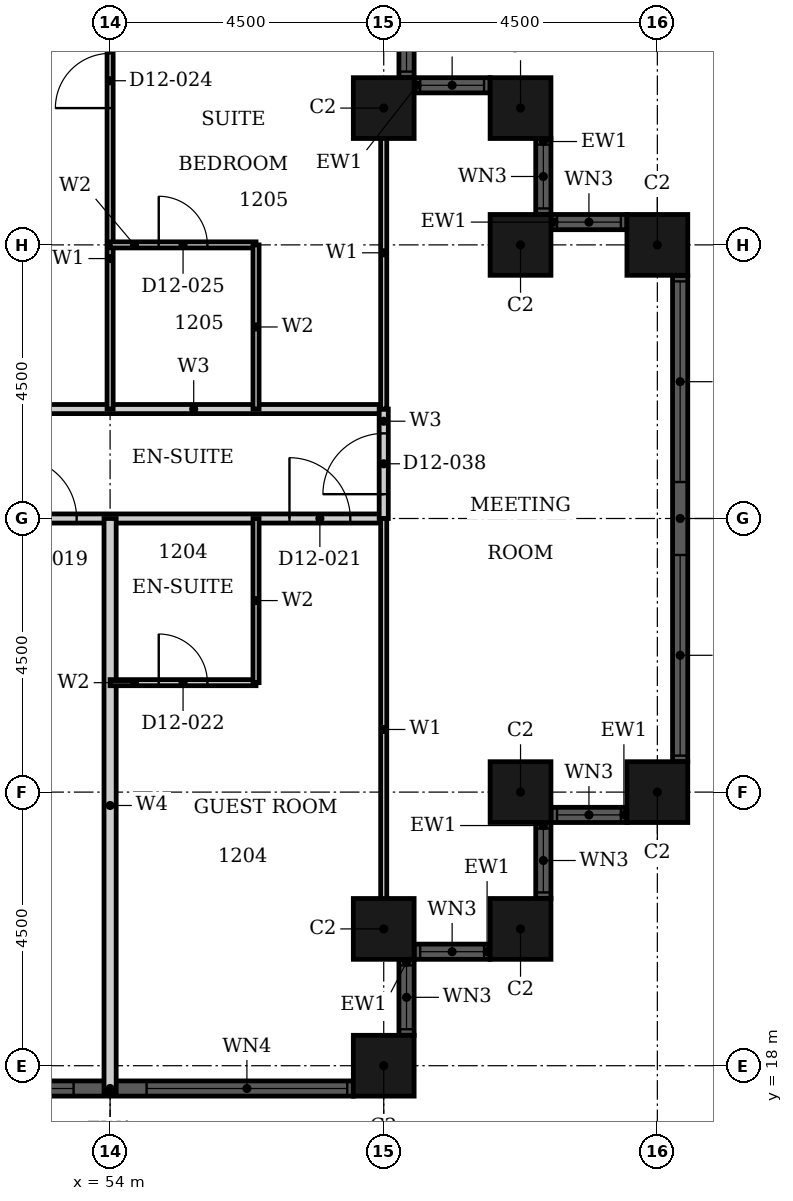
"""IFC4 building model, lengths in metres.
Left out: names, types, materials, properties, quantities, classifications, styles, units other than length and angle.
Written with IfcOpenShell. Run it as: python <this file> out.ifc"""

import sys

from ifc_helpers import new_model, si_unit, direction, frame, frame_2d, origin, origin_2d, place, context, subcontext, project, spatial, rectangle, hollow_rectangle, extrude, element, fill, save


model = new_model("IFC4")
c1 = context("Model", 3, precision=1e-05, world=origin(), true_north=direction((0.0, 1.0)))
c2 = subcontext(c1, "Body", "Model", "MODEL_VIEW")
j1 = project(units=[si_unit("LENGTHUNIT", "METRE"), si_unit("PLANEANGLEUNIT", "RADIAN")], contexts=[c1])
p1 = place(None, origin())
s1 = spatial("IfcSite", under=j1, at=p1, CompositionType="ELEMENT")
p2 = place(p1, origin())
s2 = spatial("IfcBuilding", under=s1, at=p2, CompositionType="ELEMENT")
p3 = place(p2, frame((0.0, 0.0, 56.4)))
s3 = spatial("IfcBuildingStorey", under=s2, at=p3, CompositionType="ELEMENT", Elevation=56.4)
for number, where, z_axis, x_axis in (
    (1, (58.5, 18.0, 0.0), (0.0, 0.0, 1.0), (1.0, 0.0, 0.0)),
    (2, (58.5, 20.25, 0.0), (0.0, 0.0, 1.0), (1.0, 0.0, 0.0)),
    (3, (60.75, 20.25, 0.0), (0.0, 0.0, 1.0), (1.0, 0.0, 0.0)),
    (4, (60.75, 22.5, 0.0), (0.0, 0.0, 1.0), (1.0, 0.0, 0.0)),
    (5, (63.0, 22.5, 0.0), (0.0, 0.0, 1.0), (1.0, 0.0, 0.0)),
    (6, (63.0, 31.5, 0.0), (0.0, 0.0, 1.0), (1.0, 0.0, 0.0)),
    (7, (60.75, 31.5, 0.0), (0.0, 0.0, 1.0), (1.0, 0.0, 0.0)),
    (8, (60.75, 33.75, 0.0), (0.0, 0.0, 1.0), (1.0, 0.0, 0.0)),
    (9, (58.5, 33.75, 0.0), (0.0, 0.0, 1.0), (1.0, 0.0, 0.0)),
):
    element("IfcColumn", number, at=place(p3, frame(where, z_axis=z_axis, x_axis=x_axis)), inside=s3, PredefinedType="COLUMN", context=c2, shape_type="SweptSolid", body=[
        extrude(hollow_rectangle(XDim=1.0, YDim=1.0, WallThickness=0.032, at=origin_2d()), origin(), (0.0, 0.0, 1.0), 3.6),
    ])
p4 = place(p3, frame((50.0, 17.625, 0.0), z_axis=(0.0, 0.0, 1.0), x_axis=(1.0, 0.0, 0.0)))
e10 = element("IfcWall", 10, at=p4, inside=s3, PredefinedType="SOLIDWALL", context=c2, shape_type="SweptSolid", body=[
    extrude(rectangle(XDim=8.0, YDim=0.25, at=frame_2d((4.0, 0.0))), origin(), (0.0, 0.0, 1.0), 3.6),
])
p5 = place(p4, frame((0.1, 0.0, 0.9)))
e11 = element("IfcOpeningElement", 11, at=p5, cuts=e10, PredefinedType="OPENING", context=c2, shape_type="SweptSolid", body=[
    extrude(rectangle(XDim=3.3, YDim=2.08, at=frame_2d((1.65, 1.04))), frame((0.0, 0.135, 0.0), z_axis=(0.0, -1.0, 0.0), x_axis=(1.0, 0.0, 0.0)), (0.0, 0.0, 1.0), 0.27),
])
p6 = place(p4, frame((4.6, 0.0, 0.9)))
e12 = element("IfcOpeningElement", 12, at=p6, cuts=e10, PredefinedType="OPENING", context=c2, shape_type="SweptSolid", body=[
    extrude(rectangle(XDim=3.3, YDim=2.08, at=frame_2d((1.65, 1.04))), frame((0.0, 0.135, 0.0), z_axis=(0.0, -1.0, 0.0), x_axis=(1.0, 0.0, 0.0)), (0.0, 0.0, 1.0), 0.27),
])
p7 = place(p3, frame((58.875, 18.5, 0.0), z_axis=(0.0, 0.0, 1.0), x_axis=(0.0, 1.0, 0.0)))
e13 = element("IfcWall", 13, at=p7, inside=s3, PredefinedType="SOLIDWALL", context=c2, shape_type="SweptSolid", body=[
    extrude(rectangle(XDim=1.25, YDim=0.25, at=frame_2d((0.625, 0.0))), origin(), (0.0, 0.0, 1.0), 3.6),
])
p8 = place(p7, frame((0.1, 0.0, 0.9)))
e14 = element("IfcOpeningElement", 14, at=p8, cuts=e13, PredefinedType="OPENING", context=c2, shape_type="SweptSolid", body=[
    extrude(rectangle(XDim=1.05, YDim=2.08, at=frame_2d((0.525, 1.04))), frame((0.0, 0.135, 0.0), z_axis=(0.0, -1.0, 0.0), x_axis=(1.0, 0.0, 0.0)), (0.0, 0.0, 1.0), 0.27),
])
p9 = place(p3, frame((59.0, 19.875, 0.0), z_axis=(0.0, 0.0, 1.0), x_axis=(1.0, 0.0, 0.0)))
e15 = element("IfcWall", 15, at=p9, inside=s3, PredefinedType="SOLIDWALL", context=c2, shape_type="SweptSolid", body=[
    extrude(rectangle(XDim=1.25, YDim=0.25, at=frame_2d((0.625, 0.0))), origin(), (0.0, 0.0, 1.0), 3.6),
])
p10 = place(p9, frame((0.1, 0.0, 0.9)))
e16 = element("IfcOpeningElement", 16, at=p10, cuts=e15, PredefinedType="OPENING", context=c2, shape_type="SweptSolid", body=[
    extrude(rectangle(XDim=1.05, YDim=2.08, at=frame_2d((0.525, 1.04))), frame((0.0, 0.135, 0.0), z_axis=(0.0, -1.0, 0.0), x_axis=(1.0, 0.0, 0.0)), (0.0, 0.0, 1.0), 0.27),
])
p11 = place(p3, frame((61.125, 20.75, 0.0), z_axis=(0.0, 0.0, 1.0), x_axis=(0.0, 1.0, 0.0)))
e17 = element("IfcWall", 17, at=p11, inside=s3, PredefinedType="SOLIDWALL", context=c2, shape_type="SweptSolid", body=[
    extrude(rectangle(XDim=1.25, YDim=0.25, at=frame_2d((0.625, 0.0))), origin(), (0.0, 0.0, 1.0), 3.6),
])
p12 = place(p11, frame((0.1, 0.0, 0.9)))
e18 = element("IfcOpeningElement", 18, at=p12, cuts=e17, PredefinedType="OPENING", context=c2, shape_type="SweptSolid", body=[
    extrude(rectangle(XDim=1.05, YDim=2.08, at=frame_2d((0.525, 1.04))), frame((0.0, 0.135, 0.0), z_axis=(0.0, -1.0, 0.0), x_axis=(1.0, 0.0, 0.0)), (0.0, 0.0, 1.0), 0.27),
])
p13 = place(p3, frame((61.25, 22.125, 0.0), z_axis=(0.0, 0.0, 1.0), x_axis=(1.0, 0.0, 0.0)))
e19 = element("IfcWall", 19, at=p13, inside=s3, PredefinedType="SOLIDWALL", context=c2, shape_type="SweptSolid", body=[
    extrude(rectangle(XDim=1.25, YDim=0.25, at=frame_2d((0.625, 0.0))), origin(), (0.0, 0.0, 1.0), 3.6),
])
p14 = place(p13, frame((0.1, 0.0, 0.9)))
e20 = element("IfcOpeningElement", 20, at=p14, cuts=e19, PredefinedType="OPENING", context=c2, shape_type="SweptSolid", body=[
    extrude(rectangle(XDim=1.05, YDim=2.08, at=frame_2d((0.525, 1.04))), frame((0.0, 0.135, 0.0), z_axis=(0.0, -1.0, 0.0), x_axis=(1.0, 0.0, 0.0)), (0.0, 0.0, 1.0), 0.27),
])
p15 = place(p3, frame((63.375, 23.0, 0.0), z_axis=(0.0, 0.0, 1.0), x_axis=(0.0, 1.0, 0.0)))
e21 = element("IfcWall", 21, at=p15, inside=s3, PredefinedType="SOLIDWALL", context=c2, shape_type="SweptSolid", body=[
    extrude(rectangle(XDim=8.0, YDim=0.25, at=frame_2d((4.0, 0.0))), origin(), (0.0, 0.0, 1.0), 3.6),
])
p16 = place(p15, frame((0.1, 0.0, 0.9)))
e22 = element("IfcOpeningElement", 22, at=p16, cuts=e21, PredefinedType="OPENING", context=c2, shape_type="SweptSolid", body=[
    extrude(rectangle(XDim=3.3, YDim=2.08, at=frame_2d((1.65, 1.04))), frame((0.0, 0.135, 0.0), z_axis=(0.0, -1.0, 0.0), x_axis=(1.0, 0.0, 0.0)), (0.0, 0.0, 1.0), 0.27),
])
p17 = place(p15, frame((4.6, 0.0, 0.9)))
e23 = element("IfcOpeningElement", 23, at=p17, cuts=e21, PredefinedType="OPENING", context=c2, shape_type="SweptSolid", body=[
    extrude(rectangle(XDim=3.3, YDim=2.08, at=frame_2d((1.65, 1.04))), frame((0.0, 0.135, 0.0), z_axis=(0.0, -1.0, 0.0), x_axis=(1.0, 0.0, 0.0)), (0.0, 0.0, 1.0), 0.27),
])
p18 = place(p3, frame((62.5, 31.875, 0.0), z_axis=(0.0, 0.0, 1.0), x_axis=(-1.0, 0.0, 0.0)))
e24 = element("IfcWall", 24, at=p18, inside=s3, PredefinedType="SOLIDWALL", context=c2, shape_type="SweptSolid", body=[
    extrude(rectangle(XDim=1.25, YDim=0.25, at=frame_2d((0.625, 0.0))), origin(), (0.0, 0.0, 1.0), 3.6),
])
p19 = place(p18, frame((0.1, 0.0, 0.9)))
e25 = element("IfcOpeningElement", 25, at=p19, cuts=e24, PredefinedType="OPENING", context=c2, shape_type="SweptSolid", body=[
    extrude(rectangle(XDim=1.05, YDim=2.08, at=frame_2d((0.525, 1.04))), frame((0.0, 0.135, 0.0), z_axis=(0.0, -1.0, 0.0), x_axis=(1.0, 0.0, 0.0)), (0.0, 0.0, 1.0), 0.27),
])
p20 = place(p3, frame((61.125, 32.0, 0.0), z_axis=(0.0, 0.0, 1.0), x_axis=(0.0, 1.0, 0.0)))
e26 = element("IfcWall", 26, at=p20, inside=s3, PredefinedType="SOLIDWALL", context=c2, shape_type="SweptSolid", body=[
    extrude(rectangle(XDim=1.25, YDim=0.25, at=frame_2d((0.625, 0.0))), origin(), (0.0, 0.0, 1.0), 3.6),
])
p21 = place(p20, frame((0.1, 0.0, 0.9)))
e27 = element("IfcOpeningElement", 27, at=p21, cuts=e26, PredefinedType="OPENING", context=c2, shape_type="SweptSolid", body=[
    extrude(rectangle(XDim=1.05, YDim=2.08, at=frame_2d((0.525, 1.04))), frame((0.0, 0.135, 0.0), z_axis=(0.0, -1.0, 0.0), x_axis=(1.0, 0.0, 0.0)), (0.0, 0.0, 1.0), 0.27),
])
p22 = place(p3, frame((60.25, 34.125, 0.0), z_axis=(0.0, 0.0, 1.0), x_axis=(-1.0, 0.0, 0.0)))
e28 = element("IfcWall", 28, at=p22, inside=s3, PredefinedType="SOLIDWALL", context=c2, shape_type="SweptSolid", body=[
    extrude(rectangle(XDim=1.25, YDim=0.25, at=frame_2d((0.625, 0.0))), origin(), (0.0, 0.0, 1.0), 3.6),
])
p23 = place(p22, frame((0.1, 0.0, 0.9)))
e29 = element("IfcOpeningElement", 29, at=p23, cuts=e28, PredefinedType="OPENING", context=c2, shape_type="SweptSolid", body=[
    extrude(rectangle(XDim=1.05, YDim=2.08, at=frame_2d((0.525, 1.04))), frame((0.0, 0.135, 0.0), z_axis=(0.0, -1.0, 0.0), x_axis=(1.0, 0.0, 0.0)), (0.0, 0.0, 1.0), 0.27),
])
p24 = place(p3, frame((58.875, 34.25, 0.0), z_axis=(0.0, 0.0, 1.0), x_axis=(0.0, 1.0, 0.0)))
e30 = element("IfcWall", 30, at=p24, inside=s3, PredefinedType="SOLIDWALL", context=c2, shape_type="SweptSolid", body=[
    extrude(rectangle(XDim=1.25, YDim=0.25, at=frame_2d((0.625, 0.0))), origin(), (0.0, 0.0, 1.0), 3.6),
])
p25 = place(p24, frame((0.1, 0.0, 0.9)))
e31 = element("IfcOpeningElement", 31, at=p25, cuts=e30, PredefinedType="OPENING", context=c2, shape_type="SweptSolid", body=[
    extrude(rectangle(XDim=1.05, YDim=2.08, at=frame_2d((0.525, 1.04))), frame((0.0, 0.135, 0.0), z_axis=(0.0, -1.0, 0.0), x_axis=(1.0, 0.0, 0.0)), (0.0, 0.0, 1.0), 0.27),
])
p26 = place(p3, frame((46.8, 27.0, 0.0), z_axis=(0.0, 0.0, 1.0), x_axis=(1.0, 0.0, 0.0)))
e32 = element("IfcWall", 32, at=p26, inside=s3, PredefinedType="PARTITIONING", context=c2, shape_type="SweptSolid", body=[
    extrude(rectangle(XDim=11.7, YDim=0.15, at=frame_2d((5.85, 0.0))), origin(), (0.0, 0.0, 1.0), 2.58),
])
p27 = place(p26, frame((5.65, 0.0, 0.0)))
e33 = element("IfcOpeningElement", 33, at=p27, cuts=e32, PredefinedType="OPENING", context=c2, shape_type="SweptSolid", body=[
    extrude(rectangle(XDim=1.0, YDim=2.1, at=frame_2d((0.5, 1.05))), frame((0.0, 0.085, 0.0), z_axis=(0.0, -1.0, 0.0), x_axis=(1.0, 0.0, 0.0)), (0.0, 0.0, 1.0), 0.17),
])
p28 = place(p26, frame((10.15, 0.0, 0.0)))
e34 = element("IfcOpeningElement", 34, at=p28, cuts=e32, PredefinedType="OPENING", context=c2, shape_type="SweptSolid", body=[
    extrude(rectangle(XDim=1.0, YDim=2.1, at=frame_2d((0.5, 1.05))), frame((0.0, 0.085, 0.0), z_axis=(0.0, -1.0, 0.0), x_axis=(1.0, 0.0, 0.0)), (0.0, 0.0, 1.0), 0.17),
])
p29 = place(p3, frame((46.8, 28.8, 0.0), z_axis=(0.0, 0.0, 1.0), x_axis=(1.0, 0.0, 0.0)))
e35 = element("IfcWall", 35, at=p29, inside=s3, PredefinedType="PARTITIONING", context=c2, shape_type="SweptSolid", body=[
    extrude(rectangle(XDim=11.7, YDim=0.15, at=frame_2d((5.85, 0.0))), origin(), (0.0, 0.0, 1.0), 3.3),
])
p30 = place(p29, frame((4.45, 0.0, 0.0)))
e36 = element("IfcOpeningElement", 36, at=p30, cuts=e35, PredefinedType="OPENING", context=c2, shape_type="SweptSolid", body=[
    extrude(rectangle(XDim=1.0, YDim=2.1, at=frame_2d((0.5, 1.05))), frame((0.0, 0.085, 0.0), z_axis=(0.0, -1.0, 0.0), x_axis=(1.0, 0.0, 0.0)), (0.0, 0.0, 1.0), 0.17),
])
p31 = place(p3, frame((58.5, 27.0, 0.0), z_axis=(0.0, 0.0, 1.0), x_axis=(0.0, 1.0, 0.0)))
e37 = element("IfcWall", 37, at=p31, inside=s3, PredefinedType="PARTITIONING", context=c2, shape_type="SweptSolid", body=[
    extrude(rectangle(XDim=1.8, YDim=0.15, at=frame_2d((0.9, 0.0))), origin(), (0.0, 0.0, 1.0), 3.3),
])
p32 = place(p31, frame((0.4, 0.0, 0.0)))
e38 = element("IfcOpeningElement", 38, at=p32, cuts=e37, PredefinedType="OPENING", context=c2, shape_type="SweptSolid", body=[
    extrude(rectangle(XDim=1.0, YDim=2.1, at=frame_2d((0.5, 1.05))), frame((0.0, 0.085, 0.0), z_axis=(0.0, -1.0, 0.0), x_axis=(1.0, 0.0, 0.0)), (0.0, 0.0, 1.0), 0.17),
])
p33 = place(p3, frame((54.0, 28.8, 0.0), z_axis=(0.0, 0.0, 1.0), x_axis=(0.0, 1.0, 0.0)))
e39 = element("IfcWall", 39, at=p33, inside=s3, PredefinedType="PARTITIONING", context=c2, shape_type="SweptSolid", body=[
    extrude(rectangle(XDim=7.64, YDim=0.1, at=frame_2d((3.82, 0.0))), origin(), (0.0, 0.0, 1.0), 3.3),
])
p34 = place(p33, frame((4.95, 0.0, 0.0)))
e40 = element("IfcOpeningElement", 40, at=p34, cuts=e39, PredefinedType="OPENING", context=c2, shape_type="SweptSolid", body=[
    extrude(rectangle(XDim=0.9, YDim=2.1, at=frame_2d((0.45, 1.05))), frame((0.0, 0.06, 0.0), z_axis=(0.0, -1.0, 0.0), x_axis=(1.0, 0.0, 0.0)), (0.0, 0.0, 1.0), 0.12),
])
p35 = place(p3, frame((58.5, 20.06, 0.0), z_axis=(0.0, 0.0, 1.0), x_axis=(0.0, 1.0, 0.0)))
e41 = element("IfcWall", 41, at=p35, inside=s3, PredefinedType="PARTITIONING", context=c2, shape_type="SweptSolid", body=[
    extrude(rectangle(XDim=6.94, YDim=0.1, at=frame_2d((3.47, 0.0))), origin(), (0.0, 0.0, 1.0), 3.3),
])
p36 = place(p3, frame((58.5, 28.8, 0.0), z_axis=(0.0, 0.0, 1.0), x_axis=(0.0, 1.0, 0.0)))
e42 = element("IfcWall", 42, at=p36, inside=s3, PredefinedType="PARTITIONING", context=c2, shape_type="SweptSolid", body=[
    extrude(rectangle(XDim=5.14, YDim=0.1, at=frame_2d((2.57, 0.0))), origin(), (0.0, 0.0, 1.0), 3.3),
])
p37 = place(p3, frame((54.0, 17.56, 0.0), z_axis=(0.0, 0.0, 1.0), x_axis=(0.0, 1.0, 0.0)))
e43 = element("IfcWall", 43, at=p37, inside=s3, PredefinedType="PARTITIONING", context=c2, shape_type="SweptSolid", body=[
    extrude(rectangle(XDim=9.44, YDim=0.2, at=frame_2d((4.72, 0.0))), origin(), (0.0, 0.0, 1.0), 3.3),
])
p38 = place(p3, frame((54.0, 24.3, 0.0), z_axis=(0.0, 0.0, 1.0), x_axis=(1.0, 0.0, 0.0)))
e44 = element("IfcWall", 44, at=p38, inside=s3, PredefinedType="PARTITIONING", context=c2, shape_type="SweptSolid", body=[
    extrude(rectangle(XDim=2.4, YDim=0.1, at=frame_2d((1.2, 0.0))), origin(), (0.0, 0.0, 1.0), 3.3),
])
p39 = place(p38, frame((0.8, 0.0, 0.0)))
e45 = element("IfcOpeningElement", 45, at=p39, cuts=e44, PredefinedType="OPENING", context=c2, shape_type="SweptSolid", body=[
    extrude(rectangle(XDim=0.8, YDim=2.1, at=frame_2d((0.4, 1.05))), frame((0.0, 0.06, 0.0), z_axis=(0.0, -1.0, 0.0), x_axis=(1.0, 0.0, 0.0)), (0.0, 0.0, 1.0), 0.12),
])
p40 = place(p3, frame((54.0, 31.5, 0.0), z_axis=(0.0, 0.0, 1.0), x_axis=(1.0, 0.0, 0.0)))
e46 = element("IfcWall", 46, at=p40, inside=s3, PredefinedType="PARTITIONING", context=c2, shape_type="SweptSolid", body=[
    extrude(rectangle(XDim=2.4, YDim=0.1, at=frame_2d((1.2, 0.0))), origin(), (0.0, 0.0, 1.0), 2.58),
])
p41 = place(p40, frame((0.8, 0.0, 0.0)))
e47 = element("IfcOpeningElement", 47, at=p41, cuts=e46, PredefinedType="OPENING", context=c2, shape_type="SweptSolid", body=[
    extrude(rectangle(XDim=0.8, YDim=2.1, at=frame_2d((0.4, 1.05))), frame((0.0, 0.06, 0.0), z_axis=(0.0, -1.0, 0.0), x_axis=(1.0, 0.0, 0.0)), (0.0, 0.0, 1.0), 0.12),
])
for number, where, z_axis, x_axis in (
    (48, (56.4, 24.3, 0.0), (0.0, 0.0, 1.0), (0.0, 1.0, 0.0)),
    (49, (56.4, 28.8, 0.0), (0.0, 0.0, 1.0), (0.0, 1.0, 0.0)),
):
    element("IfcWall", number, at=place(p3, frame(where, z_axis=z_axis, x_axis=x_axis)), inside=s3, PredefinedType="PARTITIONING", context=c2, shape_type="SweptSolid", body=[
        extrude(rectangle(XDim=2.7, YDim=0.1, at=frame_2d((1.35, 0.0))), origin(), (0.0, 0.0, 1.0), 3.3),
    ])
p42 = place(p5, origin())
e50 = element("IfcWindow", 50, at=p42, inside=s3, PartitioningType="SINGLE_PANEL", PredefinedType="WINDOW", context=c2, shape_type="SweptSolid", body=[
    extrude(rectangle(XDim=3.3, YDim=2.08, at=frame_2d((1.65, 1.04))), frame((0.0, 0.03, 0.0), z_axis=(0.0, -1.0, 0.0), x_axis=(1.0, 0.0, 0.0)), (0.0, 0.0, 1.0), 0.06),
])
fill(e11, e50)
p43 = place(p6, origin())
e51 = element("IfcWindow", 51, at=p43, inside=s3, PartitioningType="SINGLE_PANEL", PredefinedType="WINDOW", context=c2, shape_type="SweptSolid", body=[
    extrude(rectangle(XDim=3.3, YDim=2.08, at=frame_2d((1.65, 1.04))), frame((0.0, 0.03, 0.0), z_axis=(0.0, -1.0, 0.0), x_axis=(1.0, 0.0, 0.0)), (0.0, 0.0, 1.0), 0.06),
])
fill(e12, e51)
p44 = place(p8, origin())
e52 = element("IfcWindow", 52, at=p44, inside=s3, PartitioningType="SINGLE_PANEL", PredefinedType="WINDOW", context=c2, shape_type="SweptSolid", body=[
    extrude(rectangle(XDim=1.05, YDim=2.08, at=frame_2d((0.525, 1.04))), frame((0.0, 0.03, 0.0), z_axis=(0.0, -1.0, 0.0), x_axis=(1.0, 0.0, 0.0)), (0.0, 0.0, 1.0), 0.06),
])
fill(e14, e52)
p45 = place(p10, origin())
e53 = element("IfcWindow", 53, at=p45, inside=s3, PartitioningType="SINGLE_PANEL", PredefinedType="WINDOW", context=c2, shape_type="SweptSolid", body=[
    extrude(rectangle(XDim=1.05, YDim=2.08, at=frame_2d((0.525, 1.04))), frame((0.0, 0.03, 0.0), z_axis=(0.0, -1.0, 0.0), x_axis=(1.0, 0.0, 0.0)), (0.0, 0.0, 1.0), 0.06),
])
fill(e16, e53)
p46 = place(p12, origin())
e54 = element("IfcWindow", 54, at=p46, inside=s3, PartitioningType="SINGLE_PANEL", PredefinedType="WINDOW", context=c2, shape_type="SweptSolid", body=[
    extrude(rectangle(XDim=1.05, YDim=2.08, at=frame_2d((0.525, 1.04))), frame((0.0, 0.03, 0.0), z_axis=(0.0, -1.0, 0.0), x_axis=(1.0, 0.0, 0.0)), (0.0, 0.0, 1.0), 0.06),
])
fill(e18, e54)
p47 = place(p14, origin())
e55 = element("IfcWindow", 55, at=p47, inside=s3, PartitioningType="SINGLE_PANEL", PredefinedType="WINDOW", context=c2, shape_type="SweptSolid", body=[
    extrude(rectangle(XDim=1.05, YDim=2.08, at=frame_2d((0.525, 1.04))), frame((0.0, 0.03, 0.0), z_axis=(0.0, -1.0, 0.0), x_axis=(1.0, 0.0, 0.0)), (0.0, 0.0, 1.0), 0.06),
])
fill(e20, e55)
p48 = place(p16, origin())
e56 = element("IfcWindow", 56, at=p48, inside=s3, PartitioningType="SINGLE_PANEL", PredefinedType="WINDOW", context=c2, shape_type="SweptSolid", body=[
    extrude(rectangle(XDim=3.3, YDim=2.08, at=frame_2d((1.65, 1.04))), frame((0.0, 0.03, 0.0), z_axis=(0.0, -1.0, 0.0), x_axis=(1.0, 0.0, 0.0)), (0.0, 0.0, 1.0), 0.06),
])
fill(e22, e56)
p49 = place(p17, origin())
e57 = element("IfcWindow", 57, at=p49, inside=s3, PartitioningType="SINGLE_PANEL", PredefinedType="WINDOW", context=c2, shape_type="SweptSolid", body=[
    extrude(rectangle(XDim=3.3, YDim=2.08, at=frame_2d((1.65, 1.04))), frame((0.0, 0.03, 0.0), z_axis=(0.0, -1.0, 0.0), x_axis=(1.0, 0.0, 0.0)), (0.0, 0.0, 1.0), 0.06),
])
fill(e23, e57)
p50 = place(p19, origin())
e58 = element("IfcWindow", 58, at=p50, inside=s3, PartitioningType="SINGLE_PANEL", PredefinedType="WINDOW", context=c2, shape_type="SweptSolid", body=[
    extrude(rectangle(XDim=1.05, YDim=2.08, at=frame_2d((0.525, 1.04))), frame((0.0, 0.03, 0.0), z_axis=(0.0, -1.0, 0.0), x_axis=(1.0, 0.0, 0.0)), (0.0, 0.0, 1.0), 0.06),
])
fill(e25, e58)
p51 = place(p21, origin())
e59 = element("IfcWindow", 59, at=p51, inside=s3, PartitioningType="SINGLE_PANEL", PredefinedType="WINDOW", context=c2, shape_type="SweptSolid", body=[
    extrude(rectangle(XDim=1.05, YDim=2.08, at=frame_2d((0.525, 1.04))), frame((0.0, 0.03, 0.0), z_axis=(0.0, -1.0, 0.0), x_axis=(1.0, 0.0, 0.0)), (0.0, 0.0, 1.0), 0.06),
])
fill(e27, e59)
p52 = place(p23, origin())
e60 = element("IfcWindow", 60, at=p52, inside=s3, PartitioningType="SINGLE_PANEL", PredefinedType="WINDOW", context=c2, shape_type="SweptSolid", body=[
    extrude(rectangle(XDim=1.05, YDim=2.08, at=frame_2d((0.525, 1.04))), frame((0.0, 0.03, 0.0), z_axis=(0.0, -1.0, 0.0), x_axis=(1.0, 0.0, 0.0)), (0.0, 0.0, 1.0), 0.06),
])
fill(e29, e60)
p53 = place(p25, origin())
e61 = element("IfcWindow", 61, at=p53, inside=s3, PartitioningType="SINGLE_PANEL", PredefinedType="WINDOW", context=c2, shape_type="SweptSolid", body=[
    extrude(rectangle(XDim=1.05, YDim=2.08, at=frame_2d((0.525, 1.04))), frame((0.0, 0.03, 0.0), z_axis=(0.0, -1.0, 0.0), x_axis=(1.0, 0.0, 0.0)), (0.0, 0.0, 1.0), 0.06),
])
fill(e31, e61)
p54 = place(p27, origin())
e62 = element("IfcDoor", 62, at=p54, inside=s3, OperationType="SINGLE_SWING_RIGHT", PredefinedType="DOOR", context=c2, shape_type="SweptSolid", body=[
    extrude(rectangle(XDim=1.0, YDim=2.1, at=frame_2d((0.5, 1.05))), frame((0.0, 0.025, 0.0), z_axis=(0.0, -1.0, 0.0), x_axis=(1.0, 0.0, 0.0)), (0.0, 0.0, 1.0), 0.05),
])
fill(e33, e62)
p55 = place(p28, origin())
e63 = element("IfcDoor", 63, at=p55, inside=s3, OperationType="SINGLE_SWING_RIGHT", PredefinedType="DOOR", context=c2, shape_type="SweptSolid", body=[
    extrude(rectangle(XDim=1.0, YDim=2.1, at=frame_2d((0.5, 1.05))), frame((0.0, 0.025, 0.0), z_axis=(0.0, -1.0, 0.0), x_axis=(1.0, 0.0, 0.0)), (0.0, 0.0, 1.0), 0.05),
])
fill(e34, e63)
p56 = place(p39, origin())
e64 = element("IfcDoor", 64, at=p56, inside=s3, OperationType="SINGLE_SWING_RIGHT", PredefinedType="DOOR", context=c2, shape_type="SweptSolid", body=[
    extrude(rectangle(XDim=0.8, YDim=2.1, at=frame_2d((0.4, 1.05))), frame((0.0, 0.025, 0.0), z_axis=(0.0, -1.0, 0.0), x_axis=(1.0, 0.0, 0.0)), (0.0, 0.0, 1.0), 0.05),
])
fill(e45, e64)
p57 = place(p34, origin())
e65 = element("IfcDoor", 65, at=p57, inside=s3, OperationType="SINGLE_SWING_RIGHT", PredefinedType="DOOR", context=c2, shape_type="SweptSolid", body=[
    extrude(rectangle(XDim=0.9, YDim=2.1, at=frame_2d((0.45, 1.05))), frame((0.0, 0.025, 0.0), z_axis=(0.0, -1.0, 0.0), x_axis=(1.0, 0.0, 0.0)), (0.0, 0.0, 1.0), 0.05),
])
fill(e40, e65)
p58 = place(p41, origin())
e66 = element("IfcDoor", 66, at=p58, inside=s3, OperationType="SINGLE_SWING_RIGHT", PredefinedType="DOOR", context=c2, shape_type="SweptSolid", body=[
    extrude(rectangle(XDim=0.8, YDim=2.1, at=frame_2d((0.4, 1.05))), frame((0.0, 0.025, 0.0), z_axis=(0.0, -1.0, 0.0), x_axis=(1.0, 0.0, 0.0)), (0.0, 0.0, 1.0), 0.05),
])
fill(e47, e66)
p59 = place(p32, origin())
e67 = element("IfcDoor", 67, at=p59, inside=s3, OperationType="SINGLE_SWING_RIGHT", PredefinedType="DOOR", context=c2, shape_type="SweptSolid", body=[
    extrude(rectangle(XDim=1.0, YDim=2.1, at=frame_2d((0.5, 1.05))), frame((0.0, 0.025, 0.0), z_axis=(0.0, -1.0, 0.0), x_axis=(1.0, 0.0, 0.0)), (0.0, 0.0, 1.0), 0.05),
])
fill(e38, e67)
save(model, sys.argv[1])
